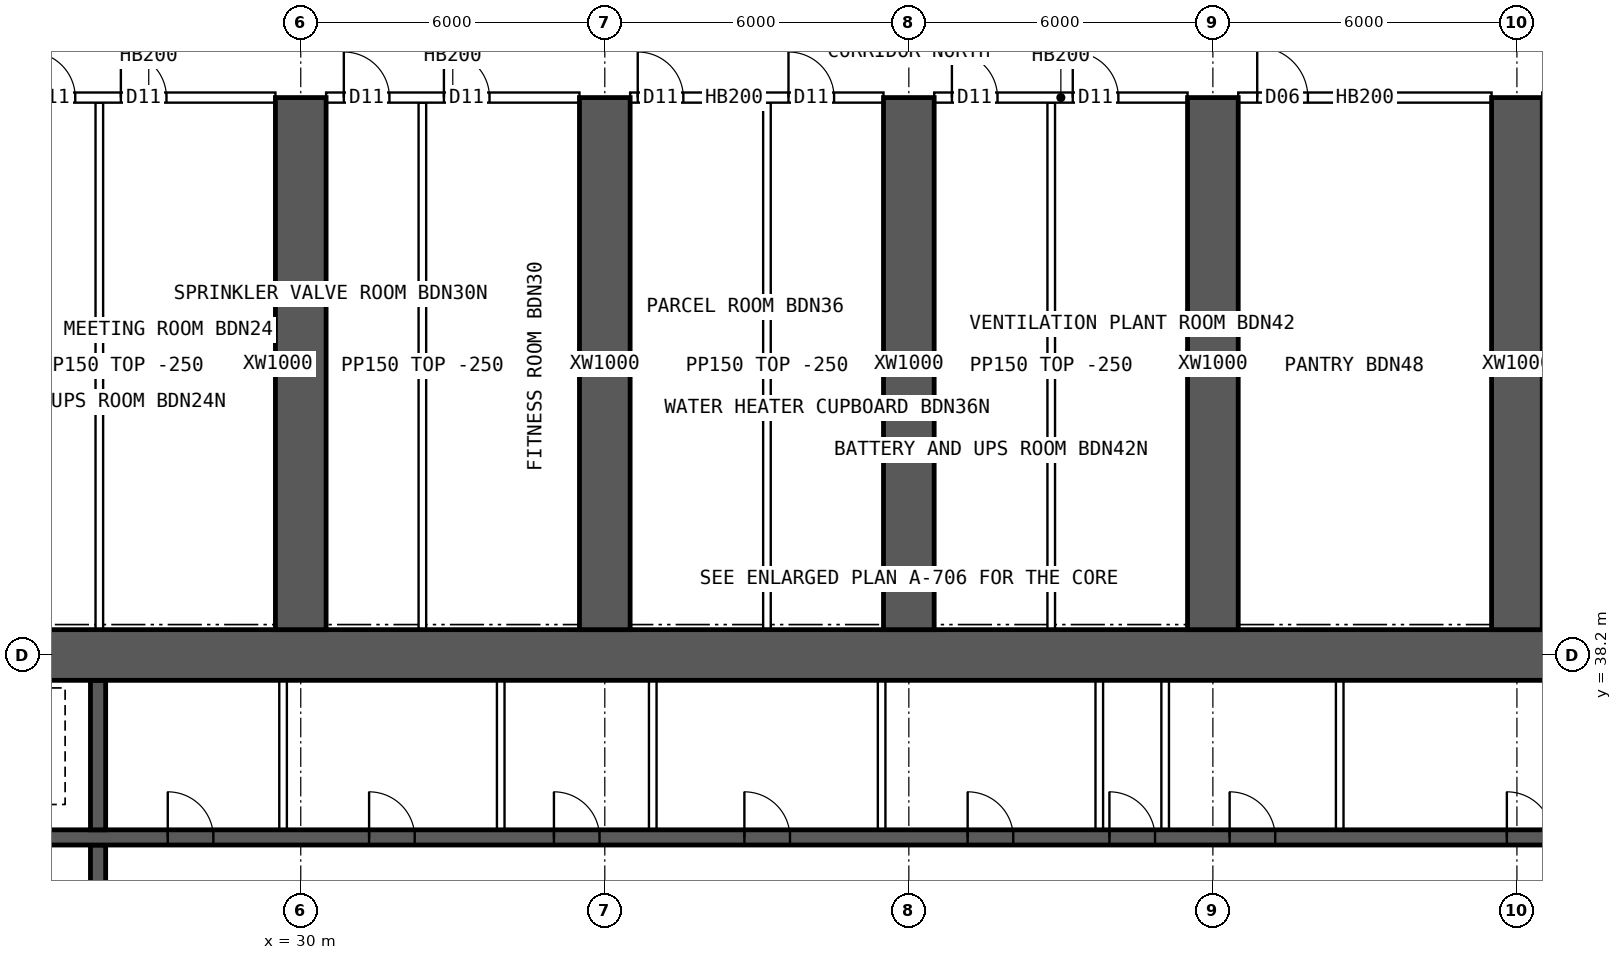
"""IFC4 building model, lengths in metres.
Left out: names, types, materials, properties, quantities, classifications, styles, units other than length and angle.
Written with IfcOpenShell. Run it as: python <this file> out.ifc"""

import sys

from ifc_helpers import new_model, si_unit, direction, frame, frame_2d, origin, place, context, subcontext, project, spatial, rectangle, extrude, element, fill, save


model = new_model("IFC4")
c1 = context("Model", 3, precision=1e-05, world=origin(), true_north=direction((0.0, 1.0)))
c2 = subcontext(c1, "Body", "Model", "MODEL_VIEW")
j1 = project(units=[si_unit("LENGTHUNIT", "METRE"), si_unit("PLANEANGLEUNIT", "RADIAN")], contexts=[c1])
p1 = place(None, origin())
s1 = spatial("IfcSite", under=j1, at=p1, CompositionType="ELEMENT")
p2 = place(p1, origin())
s2 = spatial("IfcBuilding", under=s1, at=p2, CompositionType="ELEMENT")
p3 = place(p2, frame((0.0, 0.0, 16.0)))
s3 = spatial("IfcBuildingStorey", under=s2, at=p3, CompositionType="ELEMENT", Elevation=16.0)
p4 = place(p3, frame((18.0, 38.2, 0.0), z_axis=(0.0, 0.0, 1.0), x_axis=(1.0, 0.0, 0.0)))
e1 = element("IfcWall", 1, at=p4, inside=s3, PredefinedType="SHEAR", context=c2, shape_type="SweptSolid", body=[
    extrude(rectangle(XDim=48.0, YDim=1.0, at=frame_2d((24.0, 0.0))), origin(), (0.0, 0.0, 1.0), 4.2),
])
p5 = place(p3, frame((18.5, 34.6, 0.0), z_axis=(0.0, 0.0, 1.0), x_axis=(1.0, 0.0, 0.0)))
e2 = element("IfcWall", 2, at=p5, inside=s3, PredefinedType="SHEAR", context=c2, shape_type="SweptSolid", body=[
    extrude(rectangle(XDim=47.0, YDim=0.3, at=frame_2d((23.5, 0.0))), origin(), (0.0, 0.0, 1.0), 4.2),
])
p6 = place(p5, frame((0.9, 0.0, 0.0)))
e3 = element("IfcOpeningElement", 3, at=p6, cuts=e2, PredefinedType="OPENING", context=c2, shape_type="SweptSolid", body=[
    extrude(rectangle(XDim=1.1, YDim=2.1, at=frame_2d((0.55, 1.05))), frame((0.0, 0.16, 0.0), z_axis=(0.0, -1.0, 0.0), x_axis=(1.0, 0.0, 0.0)), (0.0, 0.0, 1.0), 0.32),
])
p7 = place(p5, frame((45.0, 0.0, 0.0)))
e4 = element("IfcOpeningElement", 4, at=p7, cuts=e2, PredefinedType="OPENING", context=c2, shape_type="SweptSolid", body=[
    extrude(rectangle(XDim=1.1, YDim=2.1, at=frame_2d((0.55, 1.05))), frame((0.0, 0.16, 0.0), z_axis=(0.0, -1.0, 0.0), x_axis=(1.0, 0.0, 0.0)), (0.0, 0.0, 1.0), 0.32),
])
p8 = place(p5, frame((4.1, 0.0, 0.0)))
e5 = element("IfcOpeningElement", 5, at=p8, cuts=e2, PredefinedType="OPENING", context=c2, shape_type="SweptSolid", body=[
    extrude(rectangle(XDim=0.9, YDim=2.1, at=frame_2d((0.45, 1.05))), frame((0.0, 0.16, 0.0), z_axis=(0.0, -1.0, 0.0), x_axis=(1.0, 0.0, 0.0)), (0.0, 0.0, 1.0), 0.32),
])
p9 = place(p5, frame((42.0, 0.0, 0.0)))
e6 = element("IfcOpeningElement", 6, at=p9, cuts=e2, PredefinedType="OPENING", context=c2, shape_type="SweptSolid", body=[
    extrude(rectangle(XDim=0.9, YDim=2.1, at=frame_2d((0.45, 1.05))), frame((0.0, 0.16, 0.0), z_axis=(0.0, -1.0, 0.0), x_axis=(1.0, 0.0, 0.0)), (0.0, 0.0, 1.0), 0.32),
])
p10 = place(p5, frame((8.875, 0.0, 0.0)))
e7 = element("IfcOpeningElement", 7, at=p10, cuts=e2, PredefinedType="OPENING", context=c2, shape_type="SweptSolid", body=[
    extrude(rectangle(XDim=0.9, YDim=2.1, at=frame_2d((0.45, 1.05))), frame((0.0, 0.16, 0.0), z_axis=(0.0, -1.0, 0.0), x_axis=(1.0, 0.0, 0.0)), (0.0, 0.0, 1.0), 0.32),
])
p11 = place(p5, frame((12.849, 0.0, 0.0)))
e8 = element("IfcOpeningElement", 8, at=p11, cuts=e2, PredefinedType="OPENING", context=c2, shape_type="SweptSolid", body=[
    extrude(rectangle(XDim=0.9, YDim=2.1, at=frame_2d((0.45, 1.05))), frame((0.0, 0.16, 0.0), z_axis=(0.0, -1.0, 0.0), x_axis=(1.0, 0.0, 0.0)), (0.0, 0.0, 1.0), 0.32),
])
p12 = place(p5, frame((16.496, 0.0, 0.0)))
e9 = element("IfcOpeningElement", 9, at=p12, cuts=e2, PredefinedType="OPENING", context=c2, shape_type="SweptSolid", body=[
    extrude(rectangle(XDim=0.9, YDim=2.1, at=frame_2d((0.45, 1.05))), frame((0.0, 0.16, 0.0), z_axis=(0.0, -1.0, 0.0), x_axis=(1.0, 0.0, 0.0)), (0.0, 0.0, 1.0), 0.32),
])
p13 = place(p5, frame((20.255, 0.0, 0.0)))
e10 = element("IfcOpeningElement", 10, at=p13, cuts=e2, PredefinedType="OPENING", context=c2, shape_type="SweptSolid", body=[
    extrude(rectangle(XDim=0.9, YDim=2.1, at=frame_2d((0.45, 1.05))), frame((0.0, 0.16, 0.0), z_axis=(0.0, -1.0, 0.0), x_axis=(1.0, 0.0, 0.0)), (0.0, 0.0, 1.0), 0.32),
])
p14 = place(p5, frame((24.661, 0.0, 0.0)))
e11 = element("IfcOpeningElement", 11, at=p14, cuts=e2, PredefinedType="OPENING", context=c2, shape_type="SweptSolid", body=[
    extrude(rectangle(XDim=0.9, YDim=2.1, at=frame_2d((0.45, 1.05))), frame((0.0, 0.16, 0.0), z_axis=(0.0, -1.0, 0.0), x_axis=(1.0, 0.0, 0.0)), (0.0, 0.0, 1.0), 0.32),
])
p15 = place(p5, frame((27.458, 0.0, 0.0)))
e12 = element("IfcOpeningElement", 12, at=p15, cuts=e2, PredefinedType="OPENING", context=c2, shape_type="SweptSolid", body=[
    extrude(rectangle(XDim=0.9, YDim=2.1, at=frame_2d((0.45, 1.05))), frame((0.0, 0.16, 0.0), z_axis=(0.0, -1.0, 0.0), x_axis=(1.0, 0.0, 0.0)), (0.0, 0.0, 1.0), 0.32),
])
p16 = place(p5, frame((29.831, 0.0, 0.0)))
e13 = element("IfcOpeningElement", 13, at=p16, cuts=e2, PredefinedType="OPENING", context=c2, shape_type="SweptSolid", body=[
    extrude(rectangle(XDim=0.9, YDim=2.1, at=frame_2d((0.45, 1.05))), frame((0.0, 0.16, 0.0), z_axis=(0.0, -1.0, 0.0), x_axis=(1.0, 0.0, 0.0)), (0.0, 0.0, 1.0), 0.32),
])
p17 = place(p5, frame((35.302, 0.0, 0.0)))
e14 = element("IfcOpeningElement", 14, at=p17, cuts=e2, PredefinedType="OPENING", context=c2, shape_type="SweptSolid", body=[
    extrude(rectangle(XDim=0.9, YDim=2.1, at=frame_2d((0.45, 1.05))), frame((0.0, 0.16, 0.0), z_axis=(0.0, -1.0, 0.0), x_axis=(1.0, 0.0, 0.0)), (0.0, 0.0, 1.0), 0.32),
])
p18 = place(p3, frame((26.0, 30.55, 0.0), z_axis=(0.0, 0.0, 1.0), x_axis=(0.0, 1.0, 0.0)))
e15 = element("IfcWall", 15, at=p18, inside=s3, PredefinedType="SHEAR", context=c2, shape_type="SweptSolid", body=[
    extrude(rectangle(XDim=3.9, YDim=0.3, at=frame_2d((1.95, 0.0))), origin(), (0.0, 0.0, 1.0), 4.2),
])
p19 = place(p18, frame((1.4, 0.0, 0.0)))
e16 = element("IfcOpeningElement", 16, at=p19, cuts=e15, PredefinedType="OPENING", context=c2, shape_type="SweptSolid", body=[
    extrude(rectangle(XDim=1.2, YDim=2.1, at=frame_2d((0.6, 1.05))), frame((0.0, 0.16, 0.0), z_axis=(0.0, -1.0, 0.0), x_axis=(1.0, 0.0, 0.0)), (0.0, 0.0, 1.0), 0.32),
])
p20 = place(p3, frame((26.0, 34.75, 0.0), z_axis=(0.0, 0.0, 1.0), x_axis=(0.0, 1.0, 0.0)))
e17 = element("IfcWall", 17, at=p20, inside=s3, PredefinedType="SHEAR", context=c2, shape_type="SweptSolid", body=[
    extrude(rectangle(XDim=2.95, YDim=0.3, at=frame_2d((1.475, 0.0))), origin(), (0.0, 0.0, 1.0), 4.2),
])
for number, where, z_axis, x_axis in (
    (18, (30.0, 38.7, 0.0), (0.0, 0.0, 1.0), (0.0, 1.0, 0.0)),
    (19, (36.0, 38.7, 0.0), (0.0, 0.0, 1.0), (0.0, 1.0, 0.0)),
    (20, (42.0, 38.7, 0.0), (0.0, 0.0, 1.0), (0.0, 1.0, 0.0)),
    (21, (48.0, 38.7, 0.0), (0.0, 0.0, 1.0), (0.0, 1.0, 0.0)),
    (22, (54.0, 38.7, 0.0), (0.0, 0.0, 1.0), (0.0, 1.0, 0.0)),
):
    element("IfcWall", number, at=place(p3, frame(where, z_axis=z_axis, x_axis=x_axis)), inside=s3, PredefinedType="SHEAR", context=c2, shape_type="SweptSolid", body=[
        extrude(rectangle(XDim=10.5, YDim=1.0, at=frame_2d((5.25, 0.0))), origin(), (0.0, 0.0, 1.0), 4.2),
    ])
for number, where, z_axis, x_axis in (
    (23, (29.651, 34.75, 0.0), (0.0, 0.0, 1.0), (0.0, 1.0, 0.0)),
    (24, (33.946, 34.75, 0.0), (0.0, 0.0, 1.0), (0.0, 1.0, 0.0)),
    (25, (36.946, 34.75, 0.0), (0.0, 0.0, 1.0), (0.0, 1.0, 0.0)),
    (26, (41.463, 34.75, 0.0), (0.0, 0.0, 1.0), (0.0, 1.0, 0.0)),
    (27, (45.758, 34.75, 0.0), (0.0, 0.0, 1.0), (0.0, 1.0, 0.0)),
    (28, (47.058, 34.75, 0.0), (0.0, 0.0, 1.0), (0.0, 1.0, 0.0)),
    (29, (50.503, 34.75, 0.0), (0.0, 0.0, 1.0), (0.0, 1.0, 0.0)),
):
    element("IfcWall", number, at=place(p3, frame(where, z_axis=z_axis, x_axis=x_axis)), inside=s3, PredefinedType="SOLIDWALL", context=c2, shape_type="SweptSolid", body=[
        extrude(rectangle(XDim=2.95, YDim=0.15, at=frame_2d((1.475, 0.0))), origin(), (0.0, 0.0, 1.0), 3.95),
    ])
p21 = place(p3, frame((24.5, 49.2, 0.0), z_axis=(0.0, 0.0, 1.0), x_axis=(1.0, 0.0, 0.0)))
e30 = element("IfcWall", 30, at=p21, inside=s3, PredefinedType="SOLIDWALL", context=c2, shape_type="SweptSolid", body=[
    extrude(rectangle(XDim=5.0, YDim=0.2, at=frame_2d((2.5, 0.0))), origin(), (0.0, 0.0, 1.0), 3.95),
])
p22 = place(p21, frame((0.15, 0.0, 0.0)))
e31 = element("IfcOpeningElement", 31, at=p22, cuts=e30, PredefinedType="OPENING", context=c2, shape_type="SweptSolid", body=[
    extrude(rectangle(XDim=0.9, YDim=2.1, at=frame_2d((0.45, 1.05))), frame((0.0, 0.11, 0.0), z_axis=(0.0, -1.0, 0.0), x_axis=(1.0, 0.0, 0.0)), (0.0, 0.0, 1.0), 0.22),
])
p23 = place(p21, frame((1.95, 0.0, 0.0)))
e32 = element("IfcOpeningElement", 32, at=p23, cuts=e30, PredefinedType="OPENING", context=c2, shape_type="SweptSolid", body=[
    extrude(rectangle(XDim=0.9, YDim=2.1, at=frame_2d((0.45, 1.05))), frame((0.0, 0.11, 0.0), z_axis=(0.0, -1.0, 0.0), x_axis=(1.0, 0.0, 0.0)), (0.0, 0.0, 1.0), 0.22),
])
p24 = place(p3, frame((30.5, 49.2, 0.0), z_axis=(0.0, 0.0, 1.0), x_axis=(1.0, 0.0, 0.0)))
e33 = element("IfcWall", 33, at=p24, inside=s3, PredefinedType="SOLIDWALL", context=c2, shape_type="SweptSolid", body=[
    extrude(rectangle(XDim=5.0, YDim=0.2, at=frame_2d((2.5, 0.0))), origin(), (0.0, 0.0, 1.0), 3.95),
])
p25 = place(p24, frame((0.35, 0.0, 0.0)))
e34 = element("IfcOpeningElement", 34, at=p25, cuts=e33, PredefinedType="OPENING", context=c2, shape_type="SweptSolid", body=[
    extrude(rectangle(XDim=0.9, YDim=2.1, at=frame_2d((0.45, 1.05))), frame((0.0, 0.11, 0.0), z_axis=(0.0, -1.0, 0.0), x_axis=(1.0, 0.0, 0.0)), (0.0, 0.0, 1.0), 0.22),
])
p26 = place(p24, frame((2.325, 0.0, 0.0)))
e35 = element("IfcOpeningElement", 35, at=p26, cuts=e33, PredefinedType="OPENING", context=c2, shape_type="SweptSolid", body=[
    extrude(rectangle(XDim=0.9, YDim=2.1, at=frame_2d((0.45, 1.05))), frame((0.0, 0.11, 0.0), z_axis=(0.0, -1.0, 0.0), x_axis=(1.0, 0.0, 0.0)), (0.0, 0.0, 1.0), 0.22),
])
p27 = place(p3, frame((36.5, 49.2, 0.0), z_axis=(0.0, 0.0, 1.0), x_axis=(1.0, 0.0, 0.0)))
e36 = element("IfcWall", 36, at=p27, inside=s3, PredefinedType="SOLIDWALL", context=c2, shape_type="SweptSolid", body=[
    extrude(rectangle(XDim=5.0, YDim=0.2, at=frame_2d((2.5, 0.0))), origin(), (0.0, 0.0, 1.0), 3.95),
])
p28 = place(p27, frame((0.15, 0.0, 0.0)))
e37 = element("IfcOpeningElement", 37, at=p28, cuts=e36, PredefinedType="OPENING", context=c2, shape_type="SweptSolid", body=[
    extrude(rectangle(XDim=0.9, YDim=2.1, at=frame_2d((0.45, 1.05))), frame((0.0, 0.11, 0.0), z_axis=(0.0, -1.0, 0.0), x_axis=(1.0, 0.0, 0.0)), (0.0, 0.0, 1.0), 0.22),
])
p29 = place(p27, frame((3.125, 0.0, 0.0)))
e38 = element("IfcOpeningElement", 38, at=p29, cuts=e36, PredefinedType="OPENING", context=c2, shape_type="SweptSolid", body=[
    extrude(rectangle(XDim=0.9, YDim=2.1, at=frame_2d((0.45, 1.05))), frame((0.0, 0.11, 0.0), z_axis=(0.0, -1.0, 0.0), x_axis=(1.0, 0.0, 0.0)), (0.0, 0.0, 1.0), 0.22),
])
p30 = place(p3, frame((42.5, 49.2, 0.0), z_axis=(0.0, 0.0, 1.0), x_axis=(1.0, 0.0, 0.0)))
e39 = element("IfcWall", 39, at=p30, inside=s3, PredefinedType="SOLIDWALL", context=c2, shape_type="SweptSolid", body=[
    extrude(rectangle(XDim=5.0, YDim=0.2, at=frame_2d((2.5, 0.0))), origin(), (0.0, 0.0, 1.0), 3.95),
])
p31 = place(p30, frame((0.35, 0.0, 0.0)))
e40 = element("IfcOpeningElement", 40, at=p31, cuts=e39, PredefinedType="OPENING", context=c2, shape_type="SweptSolid", body=[
    extrude(rectangle(XDim=0.9, YDim=2.1, at=frame_2d((0.45, 1.05))), frame((0.0, 0.11, 0.0), z_axis=(0.0, -1.0, 0.0), x_axis=(1.0, 0.0, 0.0)), (0.0, 0.0, 1.0), 0.22),
])
p32 = place(p30, frame((2.735, 0.0, 0.0)))
e41 = element("IfcOpeningElement", 41, at=p32, cuts=e39, PredefinedType="OPENING", context=c2, shape_type="SweptSolid", body=[
    extrude(rectangle(XDim=0.9, YDim=2.1, at=frame_2d((0.45, 1.05))), frame((0.0, 0.11, 0.0), z_axis=(0.0, -1.0, 0.0), x_axis=(1.0, 0.0, 0.0)), (0.0, 0.0, 1.0), 0.22),
])
p33 = place(p3, frame((48.5, 49.2, 0.0), z_axis=(0.0, 0.0, 1.0), x_axis=(1.0, 0.0, 0.0)))
e42 = element("IfcWall", 42, at=p33, inside=s3, PredefinedType="SOLIDWALL", context=c2, shape_type="SweptSolid", body=[
    extrude(rectangle(XDim=5.0, YDim=0.2, at=frame_2d((2.5, 0.0))), origin(), (0.0, 0.0, 1.0), 3.95),
])
p34 = place(p33, frame((0.375, 0.0, 0.0)))
e43 = element("IfcOpeningElement", 43, at=p34, cuts=e42, PredefinedType="OPENING", context=c2, shape_type="SweptSolid", body=[
    extrude(rectangle(XDim=1.0, YDim=2.1, at=frame_2d((0.5, 1.05))), frame((0.0, 0.11, 0.0), z_axis=(0.0, -1.0, 0.0), x_axis=(1.0, 0.0, 0.0)), (0.0, 0.0, 1.0), 0.22),
])
for number, where, z_axis, x_axis in (
    (44, (26.025, 38.7, 0.0), (0.0, 0.0, 1.0), (0.0, 1.0, 0.0)),
    (45, (32.4, 38.7, 0.0), (0.0, 0.0, 1.0), (0.0, 1.0, 0.0)),
    (46, (39.2, 38.7, 0.0), (0.0, 0.0, 1.0), (0.0, 1.0, 0.0)),
    (47, (44.81, 38.7, 0.0), (0.0, 0.0, 1.0), (0.0, 1.0, 0.0)),
):
    element("IfcWall", number, at=place(p3, frame(where, z_axis=z_axis, x_axis=x_axis)), inside=s3, PredefinedType="PARTITIONING", context=c2, shape_type="SweptSolid", body=[
        extrude(rectangle(XDim=10.4, YDim=0.15, at=frame_2d((5.2, 0.0))), origin(), (0.0, 0.0, 1.0), 3.95),
    ])
p35 = place(p10, origin())
e48 = element("IfcDoor", 48, at=p35, inside=s3, OperationType="SINGLE_SWING_LEFT", PredefinedType="DOOR", context=c2, shape_type="SweptSolid", body=[
    extrude(rectangle(XDim=0.9, YDim=2.1, at=frame_2d((0.45, 1.05))), frame((0.0, 0.025, 0.0), z_axis=(0.0, -1.0, 0.0), x_axis=(1.0, 0.0, 0.0)), (0.0, 0.0, 1.0), 0.05),
])
fill(e7, e48)
p36 = place(p11, origin())
e49 = element("IfcDoor", 49, at=p36, inside=s3, OperationType="SINGLE_SWING_LEFT", PredefinedType="DOOR", context=c2, shape_type="SweptSolid", body=[
    extrude(rectangle(XDim=0.9, YDim=2.1, at=frame_2d((0.45, 1.05))), frame((0.0, 0.025, 0.0), z_axis=(0.0, -1.0, 0.0), x_axis=(1.0, 0.0, 0.0)), (0.0, 0.0, 1.0), 0.05),
])
fill(e8, e49)
p37 = place(p12, origin())
e50 = element("IfcDoor", 50, at=p37, inside=s3, OperationType="SINGLE_SWING_LEFT", PredefinedType="DOOR", context=c2, shape_type="SweptSolid", body=[
    extrude(rectangle(XDim=0.9, YDim=2.1, at=frame_2d((0.45, 1.05))), frame((0.0, 0.025, 0.0), z_axis=(0.0, -1.0, 0.0), x_axis=(1.0, 0.0, 0.0)), (0.0, 0.0, 1.0), 0.05),
])
fill(e9, e50)
p38 = place(p13, origin())
e51 = element("IfcDoor", 51, at=p38, inside=s3, OperationType="SINGLE_SWING_LEFT", PredefinedType="DOOR", context=c2, shape_type="SweptSolid", body=[
    extrude(rectangle(XDim=0.9, YDim=2.1, at=frame_2d((0.45, 1.05))), frame((0.0, 0.025, 0.0), z_axis=(0.0, -1.0, 0.0), x_axis=(1.0, 0.0, 0.0)), (0.0, 0.0, 1.0), 0.05),
])
fill(e10, e51)
p39 = place(p14, origin())
e52 = element("IfcDoor", 52, at=p39, inside=s3, OperationType="SINGLE_SWING_LEFT", PredefinedType="DOOR", context=c2, shape_type="SweptSolid", body=[
    extrude(rectangle(XDim=0.9, YDim=2.1, at=frame_2d((0.45, 1.05))), frame((0.0, 0.025, 0.0), z_axis=(0.0, -1.0, 0.0), x_axis=(1.0, 0.0, 0.0)), (0.0, 0.0, 1.0), 0.05),
])
fill(e11, e52)
p40 = place(p15, origin())
e53 = element("IfcDoor", 53, at=p40, inside=s3, OperationType="SINGLE_SWING_LEFT", PredefinedType="DOOR", context=c2, shape_type="SweptSolid", body=[
    extrude(rectangle(XDim=0.9, YDim=2.1, at=frame_2d((0.45, 1.05))), frame((0.0, 0.025, 0.0), z_axis=(0.0, -1.0, 0.0), x_axis=(1.0, 0.0, 0.0)), (0.0, 0.0, 1.0), 0.05),
])
fill(e12, e53)
p41 = place(p16, origin())
e54 = element("IfcDoor", 54, at=p41, inside=s3, OperationType="SINGLE_SWING_LEFT", PredefinedType="DOOR", context=c2, shape_type="SweptSolid", body=[
    extrude(rectangle(XDim=0.9, YDim=2.1, at=frame_2d((0.45, 1.05))), frame((0.0, 0.025, 0.0), z_axis=(0.0, -1.0, 0.0), x_axis=(1.0, 0.0, 0.0)), (0.0, 0.0, 1.0), 0.05),
])
fill(e13, e54)
p42 = place(p17, origin())
e55 = element("IfcDoor", 55, at=p42, inside=s3, OperationType="SINGLE_SWING_LEFT", PredefinedType="DOOR", context=c2, shape_type="SweptSolid", body=[
    extrude(rectangle(XDim=0.9, YDim=2.1, at=frame_2d((0.45, 1.05))), frame((0.0, 0.025, 0.0), z_axis=(0.0, -1.0, 0.0), x_axis=(1.0, 0.0, 0.0)), (0.0, 0.0, 1.0), 0.05),
])
fill(e14, e55)
p43 = place(p22, origin())
e56 = element("IfcDoor", 56, at=p43, inside=s3, OperationType="SINGLE_SWING_LEFT", PredefinedType="DOOR", context=c2, shape_type="SweptSolid", body=[
    extrude(rectangle(XDim=0.9, YDim=2.1, at=frame_2d((0.45, 1.05))), frame((0.0, 0.025, 0.0), z_axis=(0.0, -1.0, 0.0), x_axis=(1.0, 0.0, 0.0)), (0.0, 0.0, 1.0), 0.05),
])
fill(e31, e56)
p44 = place(p23, origin())
e57 = element("IfcDoor", 57, at=p44, inside=s3, OperationType="SINGLE_SWING_LEFT", PredefinedType="DOOR", context=c2, shape_type="SweptSolid", body=[
    extrude(rectangle(XDim=0.9, YDim=2.1, at=frame_2d((0.45, 1.05))), frame((0.0, 0.025, 0.0), z_axis=(0.0, -1.0, 0.0), x_axis=(1.0, 0.0, 0.0)), (0.0, 0.0, 1.0), 0.05),
])
fill(e32, e57)
p45 = place(p25, origin())
e58 = element("IfcDoor", 58, at=p45, inside=s3, OperationType="SINGLE_SWING_LEFT", PredefinedType="DOOR", context=c2, shape_type="SweptSolid", body=[
    extrude(rectangle(XDim=0.9, YDim=2.1, at=frame_2d((0.45, 1.05))), frame((0.0, 0.025, 0.0), z_axis=(0.0, -1.0, 0.0), x_axis=(1.0, 0.0, 0.0)), (0.0, 0.0, 1.0), 0.05),
])
fill(e34, e58)
p46 = place(p26, origin())
e59 = element("IfcDoor", 59, at=p46, inside=s3, OperationType="SINGLE_SWING_LEFT", PredefinedType="DOOR", context=c2, shape_type="SweptSolid", body=[
    extrude(rectangle(XDim=0.9, YDim=2.1, at=frame_2d((0.45, 1.05))), frame((0.0, 0.025, 0.0), z_axis=(0.0, -1.0, 0.0), x_axis=(1.0, 0.0, 0.0)), (0.0, 0.0, 1.0), 0.05),
])
fill(e35, e59)
p47 = place(p28, origin())
e60 = element("IfcDoor", 60, at=p47, inside=s3, OperationType="SINGLE_SWING_LEFT", PredefinedType="DOOR", context=c2, shape_type="SweptSolid", body=[
    extrude(rectangle(XDim=0.9, YDim=2.1, at=frame_2d((0.45, 1.05))), frame((0.0, 0.025, 0.0), z_axis=(0.0, -1.0, 0.0), x_axis=(1.0, 0.0, 0.0)), (0.0, 0.0, 1.0), 0.05),
])
fill(e37, e60)
p48 = place(p29, origin())
e61 = element("IfcDoor", 61, at=p48, inside=s3, OperationType="SINGLE_SWING_LEFT", PredefinedType="DOOR", context=c2, shape_type="SweptSolid", body=[
    extrude(rectangle(XDim=0.9, YDim=2.1, at=frame_2d((0.45, 1.05))), frame((0.0, 0.025, 0.0), z_axis=(0.0, -1.0, 0.0), x_axis=(1.0, 0.0, 0.0)), (0.0, 0.0, 1.0), 0.05),
])
fill(e38, e61)
p49 = place(p31, origin())
e62 = element("IfcDoor", 62, at=p49, inside=s3, OperationType="SINGLE_SWING_LEFT", PredefinedType="DOOR", context=c2, shape_type="SweptSolid", body=[
    extrude(rectangle(XDim=0.9, YDim=2.1, at=frame_2d((0.45, 1.05))), frame((0.0, 0.025, 0.0), z_axis=(0.0, -1.0, 0.0), x_axis=(1.0, 0.0, 0.0)), (0.0, 0.0, 1.0), 0.05),
])
fill(e40, e62)
p50 = place(p32, origin())
e63 = element("IfcDoor", 63, at=p50, inside=s3, OperationType="SINGLE_SWING_LEFT", PredefinedType="DOOR", context=c2, shape_type="SweptSolid", body=[
    extrude(rectangle(XDim=0.9, YDim=2.1, at=frame_2d((0.45, 1.05))), frame((0.0, 0.025, 0.0), z_axis=(0.0, -1.0, 0.0), x_axis=(1.0, 0.0, 0.0)), (0.0, 0.0, 1.0), 0.05),
])
fill(e41, e63)
p51 = place(p34, origin())
e64 = element("IfcDoor", 64, at=p51, inside=s3, OperationType="SINGLE_SWING_LEFT", PredefinedType="DOOR", context=c2, shape_type="SweptSolid", body=[
    extrude(rectangle(XDim=1.0, YDim=2.1, at=frame_2d((0.5, 1.05))), frame((0.0, 0.025, 0.0), z_axis=(0.0, -1.0, 0.0), x_axis=(1.0, 0.0, 0.0)), (0.0, 0.0, 1.0), 0.05),
])
fill(e43, e64)
save(model, sys.argv[1])
